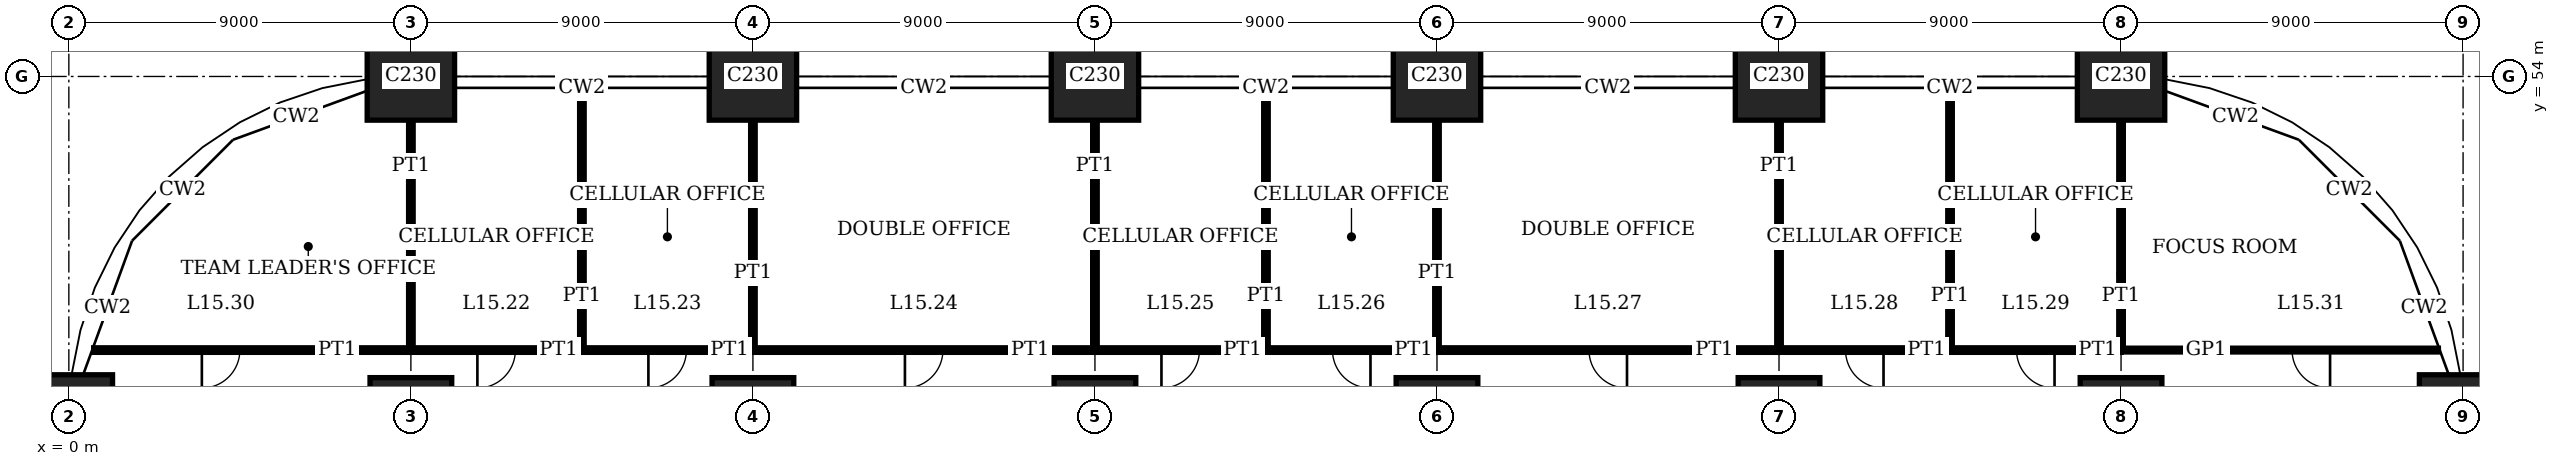
"""IFC4 building model, lengths in metres.
Left out: names, types, materials, properties, quantities, classifications, styles, units other than length and angle.
Written with IfcOpenShell. Run it as: python <this file> out.ifc"""

import sys

from ifc_helpers import new_model, si_unit, direction, frame, frame_2d, origin, origin_2d, place, context, subcontext, project, spatial, rectangle, extrude, element, fill, save


model = new_model("IFC4")
c1 = context("Model", 3, precision=1e-05, world=origin(), true_north=direction((0.0, 1.0)))
c2 = subcontext(c1, "Body", "Model", "MODEL_VIEW")
j1 = project(units=[si_unit("LENGTHUNIT", "METRE"), si_unit("PLANEANGLEUNIT", "RADIAN")], contexts=[c1])
p1 = place(None, origin())
s1 = spatial("IfcSite", under=j1, at=p1, CompositionType="ELEMENT")
p2 = place(p1, origin())
s2 = spatial("IfcBuilding", under=s1, at=p2, CompositionType="ELEMENT")
p3 = place(p2, frame((0.0, 0.0, 63.8)))
s3 = spatial("IfcBuildingStorey", under=s2, at=p3, CompositionType="ELEMENT", Elevation=63.8)
p4 = place(p3, frame((0.0, 45.0, 0.0), z_axis=(0.0, 0.0, 1.0), x_axis=(1.0, 0.0, 0.0)))
e1 = element("IfcColumn", 1, at=p4, inside=s3, PredefinedType="COLUMN", context=c2, shape_type="SweptSolid", body=[
    extrude(rectangle(XDim=2.3, YDim=2.3, at=origin_2d()), origin(), (0.0, 0.0, 1.0), 4.0),
])
p5 = place(p3, frame((9.0, 45.0, 0.0), z_axis=(0.0, 0.0, 1.0), x_axis=(1.0, 0.0, 0.0)))
e2 = element("IfcColumn", 2, at=p5, inside=s3, PredefinedType="COLUMN", context=c2, shape_type="SweptSolid", body=[
    extrude(rectangle(XDim=2.15, YDim=2.15, at=origin_2d()), origin(), (0.0, 0.0, 1.0), 4.0),
])
p6 = place(p3, frame((9.0, 54.0, 0.0), z_axis=(0.0, 0.0, 1.0), x_axis=(1.0, 0.0, 0.0)))
e3 = element("IfcColumn", 3, at=p6, inside=s3, PredefinedType="COLUMN", context=c2, shape_type="SweptSolid", body=[
    extrude(rectangle(XDim=2.3, YDim=2.3, at=origin_2d()), origin(), (0.0, 0.0, 1.0), 4.0),
])
p7 = place(p3, frame((18.0, 45.0, 0.0), z_axis=(0.0, 0.0, 1.0), x_axis=(1.0, 0.0, 0.0)))
e4 = element("IfcColumn", 4, at=p7, inside=s3, PredefinedType="COLUMN", context=c2, shape_type="SweptSolid", body=[
    extrude(rectangle(XDim=2.15, YDim=2.15, at=origin_2d()), origin(), (0.0, 0.0, 1.0), 4.0),
])
p8 = place(p3, frame((18.0, 54.0, 0.0), z_axis=(0.0, 0.0, 1.0), x_axis=(1.0, 0.0, 0.0)))
e5 = element("IfcColumn", 5, at=p8, inside=s3, PredefinedType="COLUMN", context=c2, shape_type="SweptSolid", body=[
    extrude(rectangle(XDim=2.3, YDim=2.3, at=origin_2d()), origin(), (0.0, 0.0, 1.0), 4.0),
])
p9 = place(p3, frame((27.0, 45.0, 0.0), z_axis=(0.0, 0.0, 1.0), x_axis=(1.0, 0.0, 0.0)))
e6 = element("IfcColumn", 6, at=p9, inside=s3, PredefinedType="COLUMN", context=c2, shape_type="SweptSolid", body=[
    extrude(rectangle(XDim=2.15, YDim=2.15, at=origin_2d()), origin(), (0.0, 0.0, 1.0), 4.0),
])
p10 = place(p3, frame((27.0, 54.0, 0.0), z_axis=(0.0, 0.0, 1.0), x_axis=(1.0, 0.0, 0.0)))
e7 = element("IfcColumn", 7, at=p10, inside=s3, PredefinedType="COLUMN", context=c2, shape_type="SweptSolid", body=[
    extrude(rectangle(XDim=2.3, YDim=2.3, at=origin_2d()), origin(), (0.0, 0.0, 1.0), 4.0),
])
p11 = place(p3, frame((36.0, 45.0, 0.0), z_axis=(0.0, 0.0, 1.0), x_axis=(1.0, 0.0, 0.0)))
e8 = element("IfcColumn", 8, at=p11, inside=s3, PredefinedType="COLUMN", context=c2, shape_type="SweptSolid", body=[
    extrude(rectangle(XDim=2.15, YDim=2.15, at=origin_2d()), origin(), (0.0, 0.0, 1.0), 4.0),
])
p12 = place(p3, frame((36.0, 54.0, 0.0), z_axis=(0.0, 0.0, 1.0), x_axis=(1.0, 0.0, 0.0)))
e9 = element("IfcColumn", 9, at=p12, inside=s3, PredefinedType="COLUMN", context=c2, shape_type="SweptSolid", body=[
    extrude(rectangle(XDim=2.3, YDim=2.3, at=origin_2d()), origin(), (0.0, 0.0, 1.0), 4.0),
])
p13 = place(p3, frame((45.0, 45.0, 0.0), z_axis=(0.0, 0.0, 1.0), x_axis=(1.0, 0.0, 0.0)))
e10 = element("IfcColumn", 10, at=p13, inside=s3, PredefinedType="COLUMN", context=c2, shape_type="SweptSolid", body=[
    extrude(rectangle(XDim=2.15, YDim=2.15, at=origin_2d()), origin(), (0.0, 0.0, 1.0), 4.0),
])
p14 = place(p3, frame((45.0, 54.0, 0.0), z_axis=(0.0, 0.0, 1.0), x_axis=(1.0, 0.0, 0.0)))
e11 = element("IfcColumn", 11, at=p14, inside=s3, PredefinedType="COLUMN", context=c2, shape_type="SweptSolid", body=[
    extrude(rectangle(XDim=2.3, YDim=2.3, at=origin_2d()), origin(), (0.0, 0.0, 1.0), 4.0),
])
p15 = place(p3, frame((54.0, 45.0, 0.0), z_axis=(0.0, 0.0, 1.0), x_axis=(1.0, 0.0, 0.0)))
e12 = element("IfcColumn", 12, at=p15, inside=s3, PredefinedType="COLUMN", context=c2, shape_type="SweptSolid", body=[
    extrude(rectangle(XDim=2.15, YDim=2.15, at=origin_2d()), origin(), (0.0, 0.0, 1.0), 4.0),
])
for number, where, z_axis, x_axis in (
    (13, (54.0, 54.0, 0.0), (0.0, 0.0, 1.0), (1.0, 0.0, 0.0)),
    (14, (63.0, 45.0, 0.0), (0.0, 0.0, 1.0), (1.0, 0.0, 0.0)),
):
    element("IfcColumn", number, at=place(p3, frame(where, z_axis=z_axis, x_axis=x_axis)), inside=s3, PredefinedType="COLUMN", context=c2, shape_type="SweptSolid", body=[
        extrude(rectangle(XDim=2.3, YDim=2.3, at=origin_2d()), origin(), (0.0, 0.0, 1.0), 4.0),
    ])
p16 = place(p3, frame((9.0, 46.8, 0.0), z_axis=(0.0, 0.0, 1.0), x_axis=(1.0, 0.0, 0.0)))
e15 = element("IfcWall", 15, at=p16, inside=s3, PredefinedType="PARTITIONING", context=c2, shape_type="SweptSolid", body=[
    extrude(rectangle(XDim=4.5, YDim=0.12, at=frame_2d((2.25, 0.0))), origin(), (0.0, 0.0, 1.0), 3.75),
])
p17 = place(p16, frame((1.75, 0.0, 0.0)))
e16 = element("IfcOpeningElement", 16, at=p17, cuts=e15, PredefinedType="OPENING", context=c2, shape_type="SweptSolid", body=[
    extrude(rectangle(XDim=1.0, YDim=2.4, at=frame_2d((0.5, 1.2))), frame((0.0, 0.07, 0.0), z_axis=(0.0, -1.0, 0.0), x_axis=(1.0, 0.0, 0.0)), (0.0, 0.0, 1.0), 0.14),
])
p18 = place(p3, frame((13.5, 46.8, 0.0), z_axis=(0.0, 0.0, 1.0), x_axis=(1.0, 0.0, 0.0)))
e17 = element("IfcWall", 17, at=p18, inside=s3, PredefinedType="PARTITIONING", context=c2, shape_type="SweptSolid", body=[
    extrude(rectangle(XDim=4.5, YDim=0.12, at=frame_2d((2.25, 0.0))), origin(), (0.0, 0.0, 1.0), 3.75),
])
p19 = place(p18, frame((1.75, 0.0, 0.0)))
e18 = element("IfcOpeningElement", 18, at=p19, cuts=e17, PredefinedType="OPENING", context=c2, shape_type="SweptSolid", body=[
    extrude(rectangle(XDim=1.0, YDim=2.4, at=frame_2d((0.5, 1.2))), frame((0.0, 0.07, 0.0), z_axis=(0.0, -1.0, 0.0), x_axis=(1.0, 0.0, 0.0)), (0.0, 0.0, 1.0), 0.14),
])
p20 = place(p3, frame((18.0, 46.8, 0.0), z_axis=(0.0, 0.0, 1.0), x_axis=(1.0, 0.0, 0.0)))
e19 = element("IfcWall", 19, at=p20, inside=s3, PredefinedType="PARTITIONING", context=c2, shape_type="SweptSolid", body=[
    extrude(rectangle(XDim=9.0, YDim=0.12, at=frame_2d((4.5, 0.0))), origin(), (0.0, 0.0, 1.0), 3.75),
])
p21 = place(p20, frame((4.0, 0.0, 0.0)))
e20 = element("IfcOpeningElement", 20, at=p21, cuts=e19, PredefinedType="OPENING", context=c2, shape_type="SweptSolid", body=[
    extrude(rectangle(XDim=1.0, YDim=2.4, at=frame_2d((0.5, 1.2))), frame((0.0, 0.07, 0.0), z_axis=(0.0, -1.0, 0.0), x_axis=(1.0, 0.0, 0.0)), (0.0, 0.0, 1.0), 0.14),
])
p22 = place(p3, frame((27.0, 46.8, 0.0), z_axis=(0.0, 0.0, 1.0), x_axis=(1.0, 0.0, 0.0)))
e21 = element("IfcWall", 21, at=p22, inside=s3, PredefinedType="PARTITIONING", context=c2, shape_type="SweptSolid", body=[
    extrude(rectangle(XDim=4.5, YDim=0.12, at=frame_2d((2.25, 0.0))), origin(), (0.0, 0.0, 1.0), 3.75),
])
p23 = place(p22, frame((1.75, 0.0, 0.0)))
e22 = element("IfcOpeningElement", 22, at=p23, cuts=e21, PredefinedType="OPENING", context=c2, shape_type="SweptSolid", body=[
    extrude(rectangle(XDim=1.0, YDim=2.4, at=frame_2d((0.5, 1.2))), frame((0.0, 0.07, 0.0), z_axis=(0.0, -1.0, 0.0), x_axis=(1.0, 0.0, 0.0)), (0.0, 0.0, 1.0), 0.14),
])
p24 = place(p3, frame((31.5, 46.8, 0.0), z_axis=(0.0, 0.0, 1.0), x_axis=(1.0, 0.0, 0.0)))
e23 = element("IfcWall", 23, at=p24, inside=s3, PredefinedType="PARTITIONING", context=c2, shape_type="SweptSolid", body=[
    extrude(rectangle(XDim=4.5, YDim=0.12, at=frame_2d((2.25, 0.0))), origin(), (0.0, 0.0, 1.0), 3.75),
])
p25 = place(p24, frame((1.75, 0.0, 0.0)))
e24 = element("IfcOpeningElement", 24, at=p25, cuts=e23, PredefinedType="OPENING", context=c2, shape_type="SweptSolid", body=[
    extrude(rectangle(XDim=1.0, YDim=2.4, at=frame_2d((0.5, 1.2))), frame((0.0, 0.07, 0.0), z_axis=(0.0, -1.0, 0.0), x_axis=(1.0, 0.0, 0.0)), (0.0, 0.0, 1.0), 0.14),
])
p26 = place(p3, frame((36.0, 46.8, 0.0), z_axis=(0.0, 0.0, 1.0), x_axis=(1.0, 0.0, 0.0)))
e25 = element("IfcWall", 25, at=p26, inside=s3, PredefinedType="PARTITIONING", context=c2, shape_type="SweptSolid", body=[
    extrude(rectangle(XDim=9.0, YDim=0.12, at=frame_2d((4.5, 0.0))), origin(), (0.0, 0.0, 1.0), 3.75),
])
p27 = place(p26, frame((4.0, 0.0, 0.0)))
e26 = element("IfcOpeningElement", 26, at=p27, cuts=e25, PredefinedType="OPENING", context=c2, shape_type="SweptSolid", body=[
    extrude(rectangle(XDim=1.0, YDim=2.4, at=frame_2d((0.5, 1.2))), frame((0.0, 0.07, 0.0), z_axis=(0.0, -1.0, 0.0), x_axis=(1.0, 0.0, 0.0)), (0.0, 0.0, 1.0), 0.14),
])
p28 = place(p3, frame((45.0, 46.8, 0.0), z_axis=(0.0, 0.0, 1.0), x_axis=(1.0, 0.0, 0.0)))
e27 = element("IfcWall", 27, at=p28, inside=s3, PredefinedType="PARTITIONING", context=c2, shape_type="SweptSolid", body=[
    extrude(rectangle(XDim=4.5, YDim=0.12, at=frame_2d((2.25, 0.0))), origin(), (0.0, 0.0, 1.0), 3.75),
])
p29 = place(p28, frame((1.75, 0.0, 0.0)))
e28 = element("IfcOpeningElement", 28, at=p29, cuts=e27, PredefinedType="OPENING", context=c2, shape_type="SweptSolid", body=[
    extrude(rectangle(XDim=1.0, YDim=2.4, at=frame_2d((0.5, 1.2))), frame((0.0, 0.07, 0.0), z_axis=(0.0, -1.0, 0.0), x_axis=(1.0, 0.0, 0.0)), (0.0, 0.0, 1.0), 0.14),
])
p30 = place(p3, frame((49.5, 46.8, 0.0), z_axis=(0.0, 0.0, 1.0), x_axis=(1.0, 0.0, 0.0)))
e29 = element("IfcWall", 29, at=p30, inside=s3, PredefinedType="PARTITIONING", context=c2, shape_type="SweptSolid", body=[
    extrude(rectangle(XDim=4.5, YDim=0.12, at=frame_2d((2.25, 0.0))), origin(), (0.0, 0.0, 1.0), 3.75),
])
p31 = place(p30, frame((1.75, 0.0, 0.0)))
e30 = element("IfcOpeningElement", 30, at=p31, cuts=e29, PredefinedType="OPENING", context=c2, shape_type="SweptSolid", body=[
    extrude(rectangle(XDim=1.0, YDim=2.4, at=frame_2d((0.5, 1.2))), frame((0.0, 0.07, 0.0), z_axis=(0.0, -1.0, 0.0), x_axis=(1.0, 0.0, 0.0)), (0.0, 0.0, 1.0), 0.14),
])
p32 = place(p3, frame((0.653, 46.8, 0.0), z_axis=(0.0, 0.0, 1.0), x_axis=(1.0, 0.0, 0.0)))
e31 = element("IfcWall", 31, at=p32, inside=s3, PredefinedType="PARTITIONING", context=c2, shape_type="SweptSolid", body=[
    extrude(rectangle(XDim=8.347, YDim=0.12, at=frame_2d((4.174, 0.0))), origin(), (0.0, 0.0, 1.0), 3.75),
])
p33 = place(p32, frame((2.847, 0.0, 0.0)))
e32 = element("IfcOpeningElement", 32, at=p33, cuts=e31, PredefinedType="OPENING", context=c2, shape_type="SweptSolid", body=[
    extrude(rectangle(XDim=1.0, YDim=2.4, at=frame_2d((0.5, 1.2))), frame((0.0, 0.07, 0.0), z_axis=(0.0, -1.0, 0.0), x_axis=(1.0, 0.0, 0.0)), (0.0, 0.0, 1.0), 0.14),
])
p34 = place(p3, frame((54.0, 46.8, 0.0), z_axis=(0.0, 0.0, 1.0), x_axis=(1.0, 0.0, 0.0)))
e33 = element("IfcWall", 33, at=p34, inside=s3, PredefinedType="PARTITIONING", context=c2, shape_type="SweptSolid", body=[
    extrude(rectangle(XDim=8.351, YDim=0.1, at=frame_2d((4.175, 0.0))), origin(), (0.0, 0.0, 1.0), 3.75),
])
p35 = place(p34, frame((4.5, 0.0, 0.0)))
e34 = element("IfcOpeningElement", 34, at=p35, cuts=e33, PredefinedType="OPENING", context=c2, shape_type="SweptSolid", body=[
    extrude(rectangle(XDim=1.0, YDim=2.4, at=frame_2d((0.5, 1.2))), frame((0.0, 0.06, 0.0), z_axis=(0.0, -1.0, 0.0), x_axis=(1.0, 0.0, 0.0)), (0.0, 0.0, 1.0), 0.12),
])
p36 = place(p3, frame((9.0, 46.8, 0.0), z_axis=(0.0, 0.0, 1.0), x_axis=(0.0, 1.0, 0.0)))
e35 = element("IfcWall", 35, at=p36, inside=s3, PredefinedType="PARTITIONING", context=c2, shape_type="SweptSolid", body=[
    extrude(rectangle(XDim=6.05, YDim=0.12, at=frame_2d((3.025, 0.0))), origin(), (0.0, 0.0, 1.0), 3.05),
])
p37 = place(p3, frame((13.5, 46.8, 0.0), z_axis=(0.0, 0.0, 1.0), x_axis=(0.0, 1.0, 0.0)))
e36 = element("IfcWall", 36, at=p37, inside=s3, PredefinedType="PARTITIONING", context=c2, shape_type="SweptSolid", body=[
    extrude(rectangle(XDim=6.89, YDim=0.12, at=frame_2d((3.445, 0.0))), origin(), (0.0, 0.0, 1.0), 3.75),
])
for number, where, z_axis, x_axis in (
    (37, (18.0, 46.8, 0.0), (0.0, 0.0, 1.0), (0.0, 1.0, 0.0)),
    (38, (27.0, 46.8, 0.0), (0.0, 0.0, 1.0), (0.0, 1.0, 0.0)),
):
    element("IfcWall", number, at=place(p3, frame(where, z_axis=z_axis, x_axis=x_axis)), inside=s3, PredefinedType="PARTITIONING", context=c2, shape_type="SweptSolid", body=[
        extrude(rectangle(XDim=6.05, YDim=0.12, at=frame_2d((3.025, 0.0))), origin(), (0.0, 0.0, 1.0), 3.05),
    ])
p38 = place(p3, frame((31.5, 46.8, 0.0), z_axis=(0.0, 0.0, 1.0), x_axis=(0.0, 1.0, 0.0)))
e39 = element("IfcWall", 39, at=p38, inside=s3, PredefinedType="PARTITIONING", context=c2, shape_type="SweptSolid", body=[
    extrude(rectangle(XDim=6.89, YDim=0.12, at=frame_2d((3.445, 0.0))), origin(), (0.0, 0.0, 1.0), 3.75),
])
for number, where, z_axis, x_axis in (
    (40, (36.0, 46.8, 0.0), (0.0, 0.0, 1.0), (0.0, 1.0, 0.0)),
    (41, (45.0, 46.8, 0.0), (0.0, 0.0, 1.0), (0.0, 1.0, 0.0)),
):
    element("IfcWall", number, at=place(p3, frame(where, z_axis=z_axis, x_axis=x_axis)), inside=s3, PredefinedType="PARTITIONING", context=c2, shape_type="SweptSolid", body=[
        extrude(rectangle(XDim=6.05, YDim=0.12, at=frame_2d((3.025, 0.0))), origin(), (0.0, 0.0, 1.0), 3.05),
    ])
p39 = place(p3, frame((49.5, 46.8, 0.0), z_axis=(0.0, 0.0, 1.0), x_axis=(0.0, 1.0, 0.0)))
e42 = element("IfcWall", 42, at=p39, inside=s3, PredefinedType="PARTITIONING", context=c2, shape_type="SweptSolid", body=[
    extrude(rectangle(XDim=6.89, YDim=0.12, at=frame_2d((3.445, 0.0))), origin(), (0.0, 0.0, 1.0), 3.75),
])
p40 = place(p3, frame((54.0, 46.8, 0.0), z_axis=(0.0, 0.0, 1.0), x_axis=(0.0, 1.0, 0.0)))
e43 = element("IfcWall", 43, at=p40, inside=s3, PredefinedType="PARTITIONING", context=c2, shape_type="SweptSolid", body=[
    extrude(rectangle(XDim=6.05, YDim=0.12, at=frame_2d((3.025, 0.0))), origin(), (0.0, 0.0, 1.0), 3.05),
])
p41 = place(p17, origin())
e44 = element("IfcDoor", 44, at=p41, inside=s3, OperationType="SINGLE_SWING_LEFT", PredefinedType="DOOR", context=c2, shape_type="SweptSolid", body=[
    extrude(rectangle(XDim=1.0, YDim=2.4, at=frame_2d((0.5, 1.2))), frame((0.0, 0.025, 0.0), z_axis=(0.0, -1.0, 0.0), x_axis=(1.0, 0.0, 0.0)), (0.0, 0.0, 1.0), 0.05),
])
fill(e16, e44)
p42 = place(p19, origin())
e45 = element("IfcDoor", 45, at=p42, inside=s3, OperationType="SINGLE_SWING_LEFT", PredefinedType="DOOR", context=c2, shape_type="SweptSolid", body=[
    extrude(rectangle(XDim=1.0, YDim=2.4, at=frame_2d((0.5, 1.2))), frame((0.0, 0.025, 0.0), z_axis=(0.0, -1.0, 0.0), x_axis=(1.0, 0.0, 0.0)), (0.0, 0.0, 1.0), 0.05),
])
fill(e18, e45)
p43 = place(p21, origin())
e46 = element("IfcDoor", 46, at=p43, inside=s3, OperationType="SINGLE_SWING_LEFT", PredefinedType="DOOR", context=c2, shape_type="SweptSolid", body=[
    extrude(rectangle(XDim=1.0, YDim=2.4, at=frame_2d((0.5, 1.2))), frame((0.0, 0.025, 0.0), z_axis=(0.0, -1.0, 0.0), x_axis=(1.0, 0.0, 0.0)), (0.0, 0.0, 1.0), 0.05),
])
fill(e20, e46)
p44 = place(p23, origin())
e47 = element("IfcDoor", 47, at=p44, inside=s3, OperationType="SINGLE_SWING_LEFT", PredefinedType="DOOR", context=c2, shape_type="SweptSolid", body=[
    extrude(rectangle(XDim=1.0, YDim=2.4, at=frame_2d((0.5, 1.2))), frame((0.0, 0.025, 0.0), z_axis=(0.0, -1.0, 0.0), x_axis=(1.0, 0.0, 0.0)), (0.0, 0.0, 1.0), 0.05),
])
fill(e22, e47)
p45 = place(p25, origin())
e48 = element("IfcDoor", 48, at=p45, inside=s3, OperationType="SINGLE_SWING_RIGHT", PredefinedType="DOOR", context=c2, shape_type="SweptSolid", body=[
    extrude(rectangle(XDim=1.0, YDim=2.4, at=frame_2d((0.5, 1.2))), frame((0.0, 0.025, 0.0), z_axis=(0.0, -1.0, 0.0), x_axis=(1.0, 0.0, 0.0)), (0.0, 0.0, 1.0), 0.05),
])
fill(e24, e48)
p46 = place(p27, origin())
e49 = element("IfcDoor", 49, at=p46, inside=s3, OperationType="SINGLE_SWING_RIGHT", PredefinedType="DOOR", context=c2, shape_type="SweptSolid", body=[
    extrude(rectangle(XDim=1.0, YDim=2.4, at=frame_2d((0.5, 1.2))), frame((0.0, 0.025, 0.0), z_axis=(0.0, -1.0, 0.0), x_axis=(1.0, 0.0, 0.0)), (0.0, 0.0, 1.0), 0.05),
])
fill(e26, e49)
p47 = place(p29, origin())
e50 = element("IfcDoor", 50, at=p47, inside=s3, OperationType="SINGLE_SWING_RIGHT", PredefinedType="DOOR", context=c2, shape_type="SweptSolid", body=[
    extrude(rectangle(XDim=1.0, YDim=2.4, at=frame_2d((0.5, 1.2))), frame((0.0, 0.025, 0.0), z_axis=(0.0, -1.0, 0.0), x_axis=(1.0, 0.0, 0.0)), (0.0, 0.0, 1.0), 0.05),
])
fill(e28, e50)
p48 = place(p31, origin())
e51 = element("IfcDoor", 51, at=p48, inside=s3, OperationType="SINGLE_SWING_RIGHT", PredefinedType="DOOR", context=c2, shape_type="SweptSolid", body=[
    extrude(rectangle(XDim=1.0, YDim=2.4, at=frame_2d((0.5, 1.2))), frame((0.0, 0.025, 0.0), z_axis=(0.0, -1.0, 0.0), x_axis=(1.0, 0.0, 0.0)), (0.0, 0.0, 1.0), 0.05),
])
fill(e30, e51)
p49 = place(p33, origin())
e52 = element("IfcDoor", 52, at=p49, inside=s3, OperationType="SINGLE_SWING_LEFT", PredefinedType="DOOR", context=c2, shape_type="SweptSolid", body=[
    extrude(rectangle(XDim=1.0, YDim=2.4, at=frame_2d((0.5, 1.2))), frame((0.0, 0.025, 0.0), z_axis=(0.0, -1.0, 0.0), x_axis=(1.0, 0.0, 0.0)), (0.0, 0.0, 1.0), 0.05),
])
fill(e32, e52)
p50 = place(p35, origin())
e53 = element("IfcDoor", 53, at=p50, inside=s3, OperationType="SINGLE_SWING_RIGHT", PredefinedType="DOOR", context=c2, shape_type="SweptSolid", body=[
    extrude(rectangle(XDim=1.0, YDim=2.4, at=frame_2d((0.5, 1.2))), frame((0.0, 0.02, 0.0), z_axis=(0.0, -1.0, 0.0), x_axis=(1.0, 0.0, 0.0)), (0.0, 0.0, 1.0), 0.04),
])
fill(e34, e53)
save(model, sys.argv[1])
